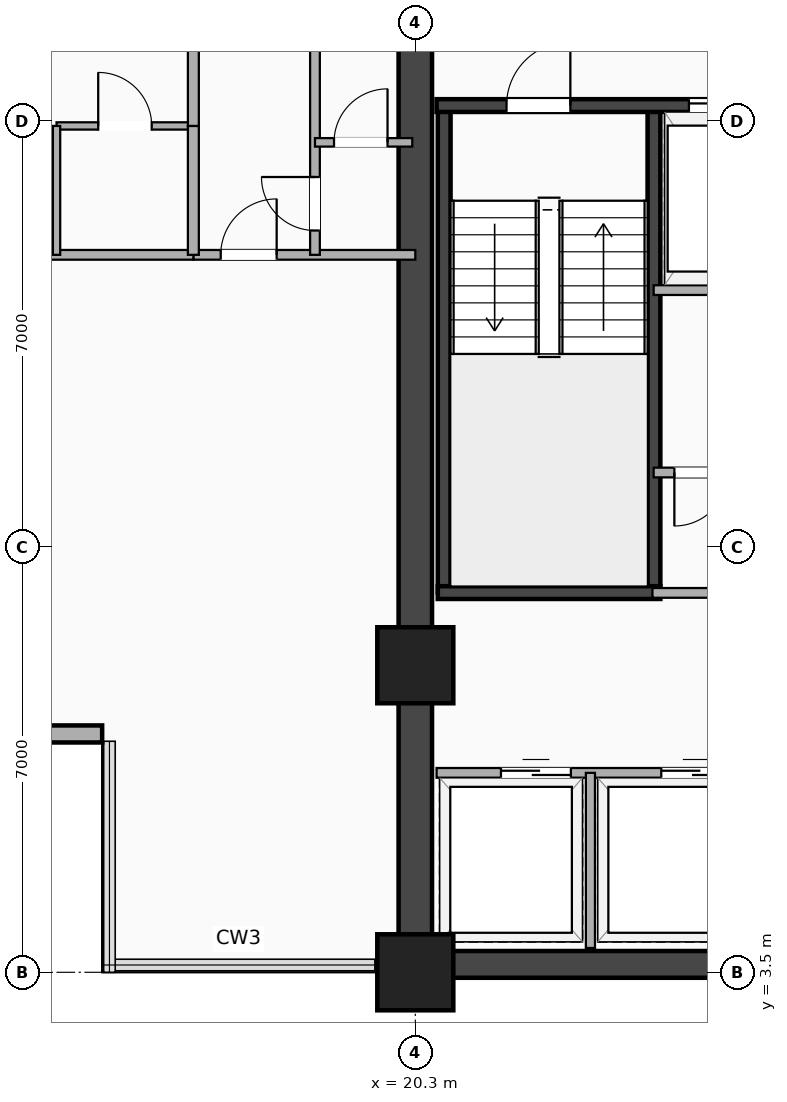
"""IFC4 building model, lengths in metres.
Left out: names, types, materials, properties, quantities, classifications, styles, units other than length and angle.
Written with IfcOpenShell. Run it as: python <this file> out.ifc"""

import sys

from ifc_helpers import new_model, si_unit, direction, frame, frame_2d, origin, origin_2d, place, context, subcontext, project, spatial, rectangle, extrude, element, fill, save


model = new_model("IFC4")
c1 = context("Model", 3, precision=1e-05, world=origin(), true_north=direction((0.0, 1.0)))
c2 = subcontext(c1, "Body", "Model", "MODEL_VIEW")
j1 = project(units=[si_unit("LENGTHUNIT", "METRE"), si_unit("PLANEANGLEUNIT", "RADIAN")], contexts=[c1])
p1 = place(None, origin())
s1 = spatial("IfcSite", under=j1, at=p1, CompositionType="ELEMENT")
p2 = place(p1, origin())
s2 = spatial("IfcBuilding", under=s1, at=p2, CompositionType="ELEMENT")
p3 = place(p2, frame((0.0, 0.0, 95.2)))
s3 = spatial("IfcBuildingStorey", under=s2, at=p3, CompositionType="ELEMENT", Elevation=95.2)
p4 = place(p3, frame((20.3, 3.63, 0.0), z_axis=(0.0, 0.0, 1.0), x_axis=(1.0, 0.0, 0.0)))
e1 = element("IfcWall", 1, at=p4, inside=s3, PredefinedType="SHEAR", context=c2, shape_type="SweptSolid", body=[
    extrude(rectangle(XDim=24.5, YDim=0.44, at=frame_2d((12.25, 0.0))), origin(), (0.0, 0.0, 1.0), 3.24),
])
p5 = place(p3, frame((20.3, 3.5, 0.0), z_axis=(0.0, 0.0, 1.0), x_axis=(0.0, 1.0, 0.0)))
e2 = element("IfcWall", 2, at=p5, inside=s3, PredefinedType="SHEAR", context=c2, shape_type="SweptSolid", body=[
    extrude(rectangle(XDim=16.9, YDim=0.55, at=frame_2d((8.45, 0.0))), origin(), (0.0, 0.0, 1.0), 3.24),
])
for number, where, z_axis, x_axis in (
    (3, (20.775, 9.745, 0.0), (0.0, 0.0, 1.0), (0.0, 1.0, 0.0)),
    (4, (24.225, 9.745, 0.0), (0.0, 0.0, 1.0), (0.0, 1.0, 0.0)),
):
    element("IfcWall", number, at=place(p3, frame(where, z_axis=z_axis, x_axis=x_axis)), inside=s3, PredefinedType="SHEAR", context=c2, shape_type="SweptSolid", body=[
        extrude(rectangle(XDim=8.01, YDim=0.21, at=frame_2d((4.005, 0.0))), origin(), (0.0, 0.0, 1.0), 3.24),
    ])
p6 = place(p3, frame((20.67, 9.745, 0.0), z_axis=(0.0, 0.0, 1.0), x_axis=(1.0, 0.0, 0.0)))
e5 = element("IfcWall", 5, at=p6, inside=s3, PredefinedType="SHEAR", context=c2, shape_type="SweptSolid", body=[
    extrude(rectangle(XDim=3.66, YDim=0.21, at=frame_2d((1.83, 0.0))), origin(), (0.0, 0.0, 1.0), 3.24),
])
p7 = place(p3, frame((20.65, 17.755, 0.0), z_axis=(0.0, 0.0, 1.0), x_axis=(1.0, 0.0, 0.0)))
e6 = element("IfcWall", 6, at=p7, inside=s3, PredefinedType="SHEAR", context=c2, shape_type="SweptSolid", body=[
    extrude(rectangle(XDim=8.3, YDim=0.21, at=frame_2d((4.15, 0.0))), origin(), (0.0, 0.0, 1.0), 3.24),
])
p8 = place(p7, frame((2.2, 0.0, 0.0), z_axis=(0.0, 0.0, 1.0), x_axis=(-1.0, 0.0, 0.0)))
e7 = element("IfcOpeningElement", 7, at=p8, cuts=e6, PredefinedType="OPENING", context=c2, shape_type="SweptSolid", body=[
    extrude(rectangle(XDim=1.05, YDim=2.15, at=frame_2d((0.525, 1.075))), frame((0.0, 0.115, 0.0), z_axis=(0.0, -1.0, 0.0), x_axis=(1.0, 0.0, 0.0)), (0.0, 0.0, 1.0), 0.23),
])
p9 = place(p7, frame((4.15, 0.0, 0.0)))
e8 = element("IfcOpeningElement", 8, at=p9, cuts=e6, PredefinedType="OPENING", context=c2, shape_type="SweptSolid", body=[
    extrude(rectangle(XDim=1.1, YDim=2.18, at=frame_2d((0.55, 1.09))), frame((0.0, 0.115, 0.0), z_axis=(0.0, -1.0, 0.0), x_axis=(1.0, 0.0, 0.0)), (0.0, 0.0, 1.0), 0.23),
])
p10 = place(p7, frame((6.45, 0.0, 0.0)))
e9 = element("IfcOpeningElement", 9, at=p10, cuts=e6, PredefinedType="OPENING", context=c2, shape_type="SweptSolid", body=[
    extrude(rectangle(XDim=1.12, YDim=2.2, at=frame_2d((0.56, 1.1))), frame((0.0, 0.115, 0.0), z_axis=(0.0, -1.0, 0.0), x_axis=(1.0, 0.0, 0.0)), (0.0, 0.0, 1.0), 0.23),
])
for number, where, z_axis, x_axis in (
    (10, (20.3, 3.5, -0.26), (0.0, 0.0, 1.0), (1.0, 0.0, 0.0)),
    (11, (20.3, 8.55, -0.26), (0.0, 0.0, 1.0), (1.0, 0.0, 0.0)),
):
    element("IfcColumn", number, at=place(p3, frame(where, z_axis=z_axis, x_axis=x_axis)), inside=s3, PredefinedType="COLUMN", context=c2, shape_type="SweptSolid", body=[
        extrude(rectangle(XDim=1.25, YDim=1.25, at=origin_2d()), origin(), (0.0, 0.0, 1.0), 3.5),
    ])
p11 = place(p3, frame((11.35, 7.42, 0.0), z_axis=(0.0, 0.0, 1.0), x_axis=(1.0, 0.0, 0.0)))
e12 = element("IfcWall", 12, at=p11, inside=s3, PredefinedType="SOLIDWALL", context=c2, shape_type="SweptSolid", body=[
    extrude(rectangle(XDim=3.8, YDim=0.28, at=frame_2d((1.9, 0.0))), origin(), (0.0, 0.0, 1.0), 3.24),
])
p12 = place(p11, frame((1.025, 0.0, 0.85)))
e13 = element("IfcOpeningElement", 13, at=p12, cuts=e12, PredefinedType="OPENING", context=c2, shape_type="SweptSolid", body=[
    extrude(rectangle(XDim=1.75, YDim=1.65, at=frame_2d((0.875, 0.825))), frame((0.0, 0.15, 0.0), z_axis=(0.0, -1.0, 0.0), x_axis=(1.0, 0.0, 0.0)), (0.0, 0.0, 1.0), 0.3),
])
p13 = place(p3, frame((24.22, 14.72, 0.0), z_axis=(0.0, 0.0, 1.0), x_axis=(1.0, 0.0, 0.0)))
e14 = element("IfcWall", 14, at=p13, inside=s3, PredefinedType="PARTITIONING", context=c2, shape_type="SweptSolid", body=[
    extrude(rectangle(XDim=4.73, YDim=0.16, at=frame_2d((2.365, 0.0))), origin(), (0.0, 0.0, 1.0), 3.24),
])
p14 = place(p3, frame((24.22, 11.72, 0.0), z_axis=(0.0, 0.0, 1.0), x_axis=(1.0, 0.0, 0.0)))
e15 = element("IfcWall", 15, at=p14, inside=s3, PredefinedType="PARTITIONING", context=c2, shape_type="SweptSolid", body=[
    extrude(rectangle(XDim=1.561, YDim=0.16, at=frame_2d((0.781, 0.0))), origin(), (0.0, 0.0, 1.0), 3.24),
])
p15 = place(p14, frame((0.341, 0.0, 0.0)))
e16 = element("IfcOpeningElement", 16, at=p15, cuts=e15, PredefinedType="OPENING", context=c2, shape_type="SweptSolid", body=[
    extrude(rectangle(XDim=0.88, YDim=2.08, at=frame_2d((0.44, 1.04))), frame((0.0, 0.09, 0.0), z_axis=(0.0, -1.0, 0.0), x_axis=(1.0, 0.0, 0.0)), (0.0, 0.0, 1.0), 0.18),
])
p16 = place(p3, frame((20.65, 6.78, 0.0), z_axis=(0.0, 0.0, 1.0), x_axis=(1.0, 0.0, 0.0)))
e17 = element("IfcWall", 17, at=p16, inside=s3, PredefinedType="PARTITIONING", context=c2, shape_type="SweptSolid", body=[
    extrude(rectangle(XDim=8.3, YDim=0.16, at=frame_2d((4.15, 0.0))), origin(), (0.0, 0.0, 1.0), 2.313),
])
p17 = place(p16, frame((3.695, 0.0, 0.0)))
e18 = element("IfcOpeningElement", 18, at=p17, cuts=e17, PredefinedType="OPENING", context=c2, shape_type="SweptSolid", body=[
    extrude(rectangle(XDim=1.15, YDim=2.2, at=frame_2d((0.575, 1.1))), frame((0.0, 0.09, 0.0), z_axis=(0.0, -1.0, 0.0), x_axis=(1.0, 0.0, 0.0)), (0.0, 0.0, 1.0), 0.18),
])
p18 = place(p16, frame((5.492, 0.0, 0.0)))
e19 = element("IfcOpeningElement", 19, at=p18, cuts=e17, PredefinedType="OPENING", context=c2, shape_type="SweptSolid", body=[
    extrude(rectangle(XDim=1.15, YDim=2.2, at=frame_2d((0.575, 1.1))), frame((0.0, 0.09, 0.0), z_axis=(0.0, -1.0, 0.0), x_axis=(1.0, 0.0, 0.0)), (0.0, 0.0, 1.0), 0.18),
])
p19 = place(p16, frame((1.059, 0.0, 0.0)))
e20 = element("IfcOpeningElement", 20, at=p19, cuts=e17, PredefinedType="OPENING", context=c2, shape_type="SweptSolid", body=[
    extrude(rectangle(XDim=1.15, YDim=2.2, at=frame_2d((0.575, 1.1))), frame((0.0, 0.09, 0.0), z_axis=(0.0, -1.0, 0.0), x_axis=(1.0, 0.0, 0.0)), (0.0, 0.0, 1.0), 0.18),
])
p20 = place(p3, frame((23.18, 3.9, 0.0), z_axis=(0.0, 0.0, 1.0), x_axis=(0.0, 1.0, 0.0)))
e21 = element("IfcWall", 21, at=p20, inside=s3, PredefinedType="PARTITIONING", context=c2, shape_type="SweptSolid", body=[
    extrude(rectangle(XDim=2.88, YDim=0.15, at=frame_2d((1.44, 0.0))), origin(), (0.0, 0.0, 1.0), 3.24),
])
p21 = place(p3, frame((24.2, 9.74, 0.0), z_axis=(0.0, 0.0, 1.0), x_axis=(1.0, 0.0, 0.0)))
e22 = element("IfcWall", 22, at=p21, inside=s3, PredefinedType="PARTITIONING", context=c2, shape_type="SweptSolid", body=[
    extrude(rectangle(XDim=4.8, YDim=0.16, at=frame_2d((2.4, 0.0))), origin(), (0.0, 0.0, 1.0), 3.24),
])
p22 = place(p21, frame((1.85, 0.0, 0.0)))
e23 = element("IfcOpeningElement", 23, at=p22, cuts=e22, PredefinedType="OPENING", context=c2, shape_type="SweptSolid", body=[
    extrude(rectangle(XDim=1.1, YDim=2.15, at=frame_2d((0.55, 1.075))), frame((0.0, 0.09, 0.0), z_axis=(0.0, -1.0, 0.0), x_axis=(1.0, 0.0, 0.0)), (0.0, 0.0, 1.0), 0.18),
])
p23 = place(p3, frame((16.65, 15.3, 0.0), z_axis=(0.0, 0.0, 1.0), x_axis=(1.0, 0.0, 0.0)))
e24 = element("IfcWall", 24, at=p23, inside=s3, PredefinedType="PARTITIONING", context=c2, shape_type="SweptSolid", body=[
    extrude(rectangle(XDim=3.65, YDim=0.16, at=frame_2d((1.825, 0.0))), origin(), (0.0, 0.0, 1.0), 2.313),
])
p24 = place(p23, frame((1.37, 0.0, 0.0), z_axis=(0.0, 0.0, 1.0), x_axis=(-1.0, 0.0, 0.0)))
e25 = element("IfcOpeningElement", 25, at=p24, cuts=e24, PredefinedType="OPENING", context=c2, shape_type="SweptSolid", body=[
    extrude(rectangle(XDim=0.92, YDim=2.08, at=frame_2d((0.46, 1.04))), frame((0.0, 0.09, 0.0), z_axis=(0.0, -1.0, 0.0), x_axis=(1.0, 0.0, 0.0)), (0.0, 0.0, 1.0), 0.18),
])
p25 = place(p3, frame((18.65, 15.3, 0.0), z_axis=(0.0, 0.0, 1.0), x_axis=(0.0, 1.0, 0.0)))
e26 = element("IfcWall", 26, at=p25, inside=s3, PredefinedType="PARTITIONING", context=c2, shape_type="SweptSolid", body=[
    extrude(rectangle(XDim=5.12, YDim=0.16, at=frame_2d((2.56, 0.0))), origin(), (0.0, 0.0, 1.0), 2.313),
])
p26 = place(p25, frame((1.28, 0.0, 0.0), z_axis=(0.0, 0.0, 1.0), x_axis=(-1.0, 0.0, 0.0)))
e27 = element("IfcOpeningElement", 27, at=p26, cuts=e26, PredefinedType="OPENING", context=c2, shape_type="SweptSolid", body=[
    extrude(rectangle(XDim=0.88, YDim=2.08, at=frame_2d((0.44, 1.04))), frame((0.0, 0.09, 0.0), z_axis=(0.0, -1.0, 0.0), x_axis=(1.0, 0.0, 0.0)), (0.0, 0.0, 1.0), 0.18),
])
p27 = place(p3, frame((11.47, 15.3, 0.0), z_axis=(0.0, 0.0, 1.0), x_axis=(1.0, 0.0, 0.0)))
e28 = element("IfcWall", 28, at=p27, inside=s3, PredefinedType="PARTITIONING", context=c2, shape_type="SweptSolid", body=[
    extrude(rectangle(XDim=5.18, YDim=0.16, at=frame_2d((2.59, 0.0))), origin(), (0.0, 0.0, 1.0), 2.603),
])
p28 = place(p3, frame((14.4, 17.42, 0.0), z_axis=(0.0, 0.0, 1.0), x_axis=(1.0, 0.0, 0.0)))
e29 = element("IfcWall", 29, at=p28, inside=s3, PredefinedType="PARTITIONING", context=c2, shape_type="SweptSolid", body=[
    extrude(rectangle(XDim=2.25, YDim=0.12, at=frame_2d((1.125, 0.0))), origin(), (0.0, 0.0, 1.0), 3.24),
])
p29 = place(p28, frame((1.565, 0.0, 0.0), z_axis=(0.0, 0.0, 1.0), x_axis=(-1.0, 0.0, 0.0)))
e30 = element("IfcOpeningElement", 30, at=p29, cuts=e29, PredefinedType="OPENING", context=c2, shape_type="SweptSolid", body=[
    extrude(rectangle(XDim=0.88, YDim=2.08, at=frame_2d((0.44, 1.04))), frame((0.0, 0.07, 0.0), z_axis=(0.0, -1.0, 0.0), x_axis=(1.0, 0.0, 0.0)), (0.0, 0.0, 1.0), 0.14),
])
p30 = place(p3, frame((14.4, 15.3, 0.0), z_axis=(0.0, 0.0, 1.0), x_axis=(0.0, 1.0, 0.0)))
e31 = element("IfcWall", 31, at=p30, inside=s3, PredefinedType="PARTITIONING", context=c2, shape_type="SweptSolid", body=[
    extrude(rectangle(XDim=2.12, YDim=0.12, at=frame_2d((1.06, 0.0))), origin(), (0.0, 0.0, 1.0), 2.922),
])
p31 = place(p3, frame((16.65, 15.3, 0.0), z_axis=(0.0, 0.0, 1.0), x_axis=(0.0, 1.0, 0.0)))
e32 = element("IfcWall", 32, at=p31, inside=s3, PredefinedType="PARTITIONING", context=c2, shape_type="SweptSolid", body=[
    extrude(rectangle(XDim=2.12, YDim=0.18, at=frame_2d((1.06, 0.0))), origin(), (0.0, 0.0, 1.0), 2.922),
])
p32 = place(p3, frame((16.65, 17.42, 0.0), z_axis=(0.0, 0.0, 1.0), x_axis=(0.0, 1.0, 0.0)))
e33 = element("IfcWall", 33, at=p32, inside=s3, PredefinedType="PARTITIONING", context=c2, shape_type="SweptSolid", body=[
    extrude(rectangle(XDim=3.78, YDim=0.18, at=frame_2d((1.89, 0.0))), origin(), (0.0, 0.0, 1.0), 2.313),
])
p33 = place(p32, frame((1.415, 0.0, 0.0)))
e34 = element("IfcOpeningElement", 34, at=p33, cuts=e33, PredefinedType="OPENING", context=c2, shape_type="SweptSolid", body=[
    extrude(rectangle(XDim=0.95, YDim=2.15, at=frame_2d((0.475, 1.075))), frame((0.0, 0.1, 0.0), z_axis=(0.0, -1.0, 0.0), x_axis=(1.0, 0.0, 0.0)), (0.0, 0.0, 1.0), 0.2),
])
p34 = place(p3, frame((18.65, 17.15, 0.0), z_axis=(0.0, 0.0, 1.0), x_axis=(1.0, 0.0, 0.0)))
e35 = element("IfcWall", 35, at=p34, inside=s3, PredefinedType="PARTITIONING", context=c2, shape_type="SweptSolid", body=[
    extrude(rectangle(XDim=1.6, YDim=0.14, at=frame_2d((0.8, 0.0))), origin(), (0.0, 0.0, 1.0), 2.313),
])
p35 = place(p34, frame((1.193, 0.0, 0.0), z_axis=(0.0, 0.0, 1.0), x_axis=(-1.0, 0.0, 0.0)))
e36 = element("IfcOpeningElement", 36, at=p35, cuts=e35, PredefinedType="OPENING", context=c2, shape_type="SweptSolid", body=[
    extrude(rectangle(XDim=0.88, YDim=2.08, at=frame_2d((0.44, 1.04))), frame((0.0, 0.08, 0.0), z_axis=(0.0, -1.0, 0.0), x_axis=(1.0, 0.0, 0.0)), (0.0, 0.0, 1.0), 0.16),
])
p36 = place(p8, origin())
e37 = element("IfcDoor", 37, at=p36, inside=s3, OperationType="SINGLE_SWING_RIGHT", PredefinedType="DOOR", context=c2, shape_type="SweptSolid", body=[
    extrude(rectangle(XDim=1.05, YDim=2.15, at=frame_2d((0.525, 1.075))), frame((0.0, 0.025, 0.0), z_axis=(0.0, -1.0, 0.0), x_axis=(1.0, 0.0, 0.0)), (0.0, 0.0, 1.0), 0.05),
])
fill(e7, e37)
p37 = place(p9, origin())
e38 = element("IfcDoor", 38, at=p37, inside=s3, OperationType="DOUBLE_DOOR_SLIDING", PredefinedType="DOOR", context=c2, shape_type="SweptSolid", body=[
    extrude(rectangle(XDim=1.1, YDim=2.18, at=frame_2d((0.55, 1.09))), frame((0.0, 0.025, 0.0), z_axis=(0.0, -1.0, 0.0), x_axis=(1.0, 0.0, 0.0)), (0.0, 0.0, 1.0), 0.05),
])
fill(e8, e38)
p38 = place(p15, origin())
e39 = element("IfcDoor", 39, at=p38, inside=s3, OperationType="SINGLE_SWING_LEFT", PredefinedType="DOOR", context=c2, shape_type="SweptSolid", body=[
    extrude(rectangle(XDim=0.88, YDim=2.08, at=frame_2d((0.44, 1.04))), frame((0.0, 0.025, 0.0), z_axis=(0.0, -1.0, 0.0), x_axis=(1.0, 0.0, 0.0)), (0.0, 0.0, 1.0), 0.05),
])
fill(e16, e39)
p39 = place(p17, origin())
e40 = element("IfcDoor", 40, at=p39, inside=s3, OperationType="DOUBLE_DOOR_SLIDING", PredefinedType="DOOR", context=c2, shape_type="SweptSolid", body=[
    extrude(rectangle(XDim=1.15, YDim=2.2, at=frame_2d((0.575, 1.1))), frame((0.0, 0.025, 0.0), z_axis=(0.0, -1.0, 0.0), x_axis=(1.0, 0.0, 0.0)), (0.0, 0.0, 1.0), 0.05),
])
fill(e18, e40)
p40 = place(p19, origin())
e41 = element("IfcDoor", 41, at=p40, inside=s3, OperationType="DOUBLE_DOOR_SLIDING", PredefinedType="DOOR", context=c2, shape_type="SweptSolid", body=[
    extrude(rectangle(XDim=1.15, YDim=2.2, at=frame_2d((0.575, 1.1))), frame((0.0, 0.025, 0.0), z_axis=(0.0, -1.0, 0.0), x_axis=(1.0, 0.0, 0.0)), (0.0, 0.0, 1.0), 0.05),
])
fill(e20, e41)
p41 = place(p24, origin())
e42 = element("IfcDoor", 42, at=p41, inside=s3, OperationType="SINGLE_SWING_RIGHT", PredefinedType="DOOR", context=c2, shape_type="SweptSolid", body=[
    extrude(rectangle(XDim=0.92, YDim=2.08, at=frame_2d((0.46, 1.04))), frame((0.0, 0.025, 0.0), z_axis=(0.0, -1.0, 0.0), x_axis=(1.0, 0.0, 0.0)), (0.0, 0.0, 1.0), 0.05),
])
fill(e25, e42)
p42 = place(p26, origin())
e43 = element("IfcDoor", 43, at=p42, inside=s3, OperationType="SINGLE_SWING_RIGHT", PredefinedType="DOOR", context=c2, shape_type="SweptSolid", body=[
    extrude(rectangle(XDim=0.88, YDim=2.08, at=frame_2d((0.44, 1.04))), frame((0.0, 0.025, 0.0), z_axis=(0.0, -1.0, 0.0), x_axis=(1.0, 0.0, 0.0)), (0.0, 0.0, 1.0), 0.05),
])
fill(e27, e43)
p43 = place(p29, origin())
e44 = element("IfcDoor", 44, at=p43, inside=s3, OperationType="SINGLE_SWING_LEFT", PredefinedType="DOOR", context=c2, shape_type="SweptSolid", body=[
    extrude(rectangle(XDim=0.88, YDim=2.08, at=frame_2d((0.44, 1.04))), frame((0.0, 0.025, 0.0), z_axis=(0.0, -1.0, 0.0), x_axis=(1.0, 0.0, 0.0)), (0.0, 0.0, 1.0), 0.05),
])
fill(e30, e44)
p44 = place(p35, origin())
e45 = element("IfcDoor", 45, at=p44, inside=s3, OperationType="SINGLE_SWING_RIGHT", PredefinedType="DOOR", context=c2, shape_type="SweptSolid", body=[
    extrude(rectangle(XDim=0.88, YDim=2.08, at=frame_2d((0.44, 1.04))), frame((0.0, 0.025, 0.0), z_axis=(0.0, -1.0, 0.0), x_axis=(1.0, 0.0, 0.0)), (0.0, 0.0, 1.0), 0.05),
])
fill(e36, e45)
save(model, sys.argv[1])
